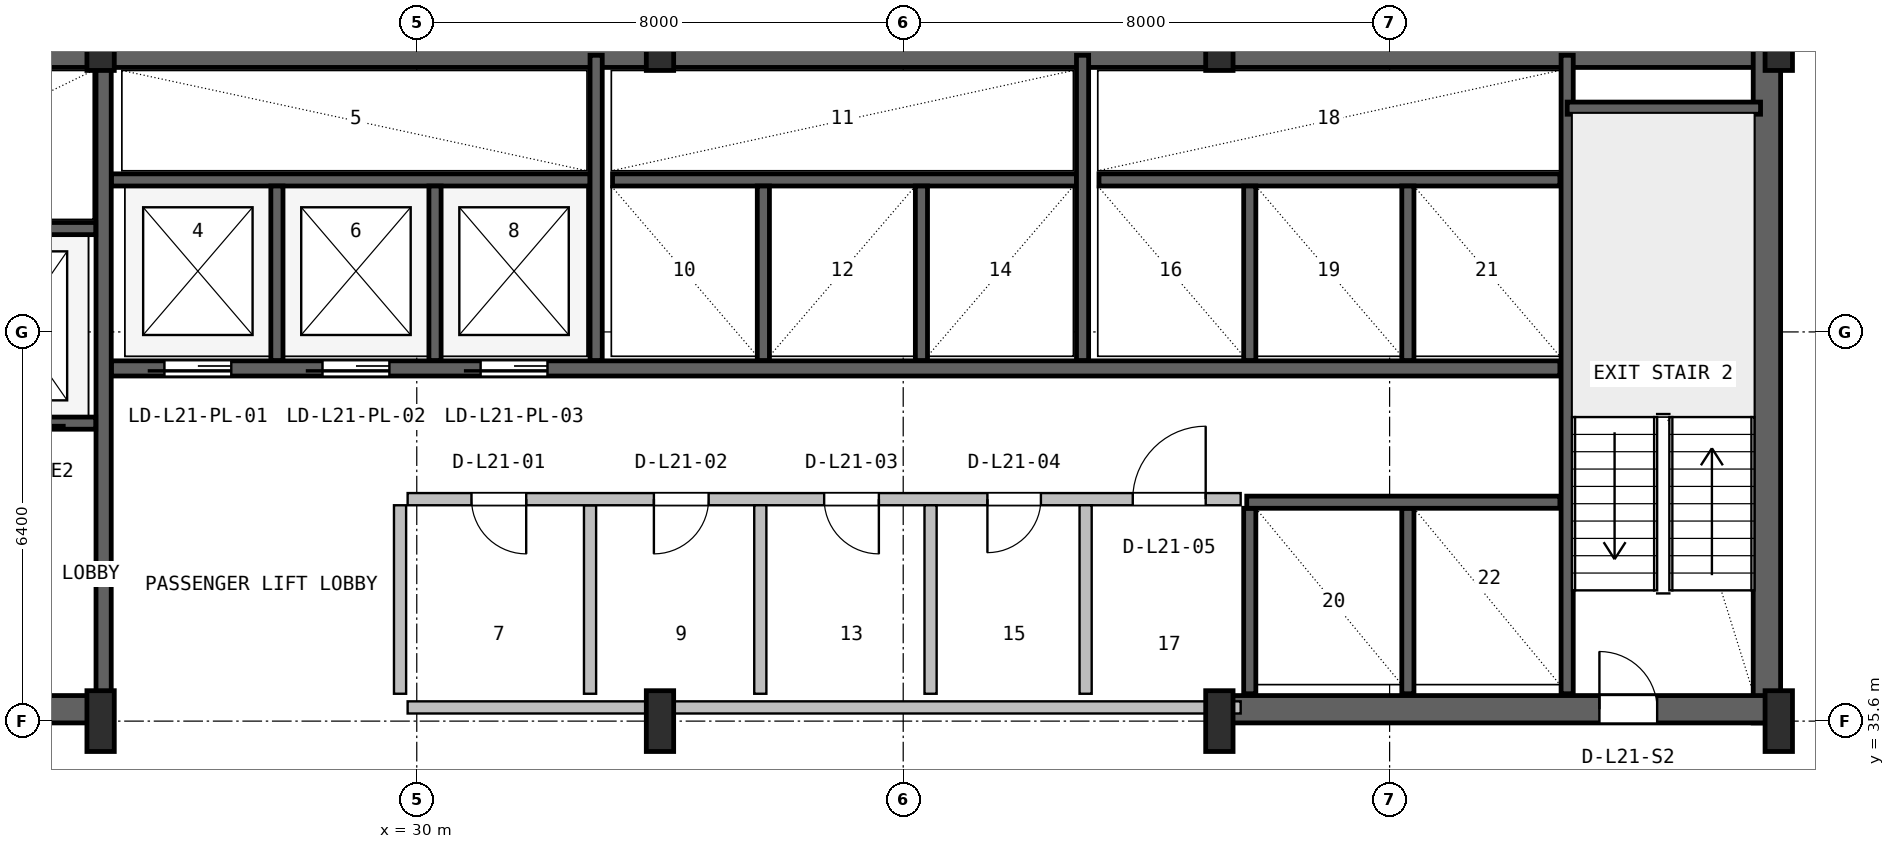
"""IFC4 building model, lengths in metres.
Left out: names, types, materials, properties, quantities, classifications, styles, units other than length and angle.
Written with IfcOpenShell. Run it as: python <this file> out.ifc"""

import sys

from ifc_helpers import new_model, si_unit, direction, frame, frame_2d, origin, origin_2d, place, context, subcontext, project, spatial, rectangle, i_section, extrude, source, transform, mapped, element, fill, save


model = new_model("IFC4")
c1 = context("Model", 3, precision=1e-05, world=origin(), true_north=direction((0.0, 1.0)))
c2 = subcontext(c1, "Body", "Model", "MODEL_VIEW")
j1 = project(units=[si_unit("LENGTHUNIT", "METRE"), si_unit("PLANEANGLEUNIT", "RADIAN")], contexts=[c1])
p1 = place(None, origin())
s1 = spatial("IfcSite", under=j1, at=p1, CompositionType="ELEMENT")
p2 = place(p1, origin())
s2 = spatial("IfcBuilding", under=s1, at=p2, CompositionType="ELEMENT")
p3 = place(p2, frame((0.0, 0.0, 90.8)))
s3 = spatial("IfcBuildingStorey", under=s2, at=p3, CompositionType="ELEMENT", Elevation=90.8)
p4 = place(p3, frame((15.6, 46.575, 0.0), z_axis=(0.0, 0.0, 1.0), x_axis=(1.0, 0.0, 0.0)))
e1 = element("IfcWall", 1, at=p4, inside=s3, PredefinedType="SHEAR", context=c2, shape_type="SweptSolid", body=[
    extrude(rectangle(XDim=36.8, YDim=0.45, at=frame_2d((18.4, 0.0))), origin(), (0.0, 0.0, 1.0), 3.55),
])
p5 = place(p3, frame((52.205, 35.57, 0.0), z_axis=(0.0, 0.0, 1.0), x_axis=(0.0, 1.0, 0.0)))
e2 = element("IfcWall", 2, at=p5, inside=s3, PredefinedType="SHEAR", context=c2, shape_type="SweptSolid", body=[
    extrude(rectangle(XDim=11.23, YDim=0.45, at=frame_2d((5.615, 0.0))), origin(), (0.0, 0.0, 1.0), 3.55),
])
p6 = place(p3, frame((15.57, 35.795, 0.0), z_axis=(0.0, 0.0, 1.0), x_axis=(1.0, 0.0, 0.0)))
e3 = element("IfcWall", 3, at=p6, inside=s3, PredefinedType="SHEAR", context=c2, shape_type="SweptSolid", body=[
    extrude(rectangle(XDim=9.23, YDim=0.45, at=frame_2d((4.615, 0.0))), origin(), (0.0, 0.0, 1.0), 3.55),
])
p7 = place(p6, frame((5.4, 0.0, 0.0)))
e4 = element("IfcOpeningElement", 4, at=p7, cuts=e3, PredefinedType="OPENING", context=c2, shape_type="SweptSolid", body=[
    extrude(rectangle(XDim=1.0, YDim=2.1, at=frame_2d((0.5, 1.05))), frame((0.0, 0.235, 0.0), z_axis=(0.0, -1.0, 0.0), x_axis=(1.0, 0.0, 0.0)), (0.0, 0.0, 1.0), 0.47),
])
p8 = place(p3, frame((43.2, 35.795, 0.0), z_axis=(0.0, 0.0, 1.0), x_axis=(1.0, 0.0, 0.0)))
e5 = element("IfcWall", 5, at=p8, inside=s3, PredefinedType="SHEAR", context=c2, shape_type="SweptSolid", body=[
    extrude(rectangle(XDim=9.23, YDim=0.45, at=frame_2d((4.615, 0.0))), origin(), (0.0, 0.0, 1.0), 3.55),
])
p9 = place(p8, frame((6.25, 0.0, 0.0)))
e6 = element("IfcOpeningElement", 6, at=p9, cuts=e5, PredefinedType="OPENING", context=c2, shape_type="SweptSolid", body=[
    extrude(rectangle(XDim=0.95, YDim=2.1, at=frame_2d((0.475, 1.05))), frame((0.0, 0.235, 0.0), z_axis=(0.0, -1.0, 0.0), x_axis=(1.0, 0.0, 0.0)), (0.0, 0.0, 1.0), 0.47),
])
m1 = source(origin(), c2, "Body", "SweptSolid", [
    extrude(i_section(OverallWidth=0.45, OverallDepth=1.0, WebThickness=0.016, FlangeThickness=0.03, FilletRadius=0.016, at=origin_2d()), origin(), (0.0, 0.0, 1.0), 3.8),
])
for number, where, z_axis, x_axis in (
    (7, (24.8, 35.6, 0.0), (0.0, 0.0, 1.0), (1.0, 0.0, 0.0)),
    (8, (24.8, 46.8, 0.0), (0.0, 0.0, 1.0), (1.0, 0.0, 0.0)),
    (9, (34.0, 35.6, 0.0), (0.0, 0.0, 1.0), (1.0, 0.0, 0.0)),
    (10, (34.0, 46.8, 0.0), (0.0, 0.0, 1.0), (1.0, 0.0, 0.0)),
    (11, (43.2, 35.6, 0.0), (0.0, 0.0, 1.0), (1.0, 0.0, 0.0)),
    (12, (43.2, 46.8, 0.0), (0.0, 0.0, 1.0), (1.0, 0.0, 0.0)),
    (13, (52.4, 35.6, 0.0), (0.0, 0.0, 1.0), (1.0, 0.0, 0.0)),
    (14, (52.4, 46.8, 0.0), (0.0, 0.0, 1.0), (1.0, 0.0, 0.0)),
):
    element("IfcColumn", number, at=place(p3, frame(where, z_axis=z_axis, x_axis=x_axis)), inside=s3, PredefinedType="COLUMN", context=c2, shape_type="MappedRepresentation", body=[
        mapped(m1, transform((0.0, 0.0, 0.0), x_axis=(1.0, 0.0, 0.0), y_axis=(0.0, 1.0, 0.0), z_axis=(0.0, 0.0, 1.0), scale=1.0)),
    ])
p10 = place(p3, frame((24.85, 36.05, 0.0), z_axis=(0.0, 0.0, 1.0), x_axis=(0.0, 1.0, 0.0)))
e15 = element("IfcWall", 15, at=p10, inside=s3, PredefinedType="SHEAR", context=c2, shape_type="SweptSolid", body=[
    extrude(rectangle(XDim=10.45, YDim=0.25, at=frame_2d((5.225, 0.0))), origin(), (0.0, 0.0, 1.0), 3.55),
])
p11 = place(p3, frame((19.2, 40.5, 0.0), z_axis=(0.0, 0.0, 1.0), x_axis=(1.0, 0.0, 0.0)))
e16 = element("IfcWall", 16, at=p11, inside=s3, PredefinedType="SHEAR", context=c2, shape_type="SweptSolid", body=[
    extrude(rectangle(XDim=5.52, YDim=0.2, at=frame_2d((2.76, 0.0))), origin(), (0.0, 0.0, 1.0), 3.55),
])
p12 = place(p11, frame((1.05, 0.0, 0.0)))
e17 = element("IfcOpeningElement", 17, at=p12, cuts=e16, PredefinedType="OPENING", context=c2, shape_type="SweptSolid", body=[
    extrude(rectangle(XDim=1.1, YDim=2.18, at=frame_2d((0.55, 1.09))), frame((0.0, 0.11, 0.0), z_axis=(0.0, -1.0, 0.0), x_axis=(1.0, 0.0, 0.0)), (0.0, 0.0, 1.0), 0.22),
])
p13 = place(p11, frame((3.65, 0.0, 0.0)))
e18 = element("IfcOpeningElement", 18, at=p13, cuts=e16, PredefinedType="OPENING", context=c2, shape_type="SweptSolid", body=[
    extrude(rectangle(XDim=1.1, YDim=2.18, at=frame_2d((0.55, 1.09))), frame((0.0, 0.11, 0.0), z_axis=(0.0, -1.0, 0.0), x_axis=(1.0, 0.0, 0.0)), (0.0, 0.0, 1.0), 0.22),
])
p14 = place(p3, frame((19.2, 43.7, 0.0), z_axis=(0.0, 0.0, 1.0), x_axis=(1.0, 0.0, 0.0)))
e19 = element("IfcWall", 19, at=p14, inside=s3, PredefinedType="SHEAR", context=c2, shape_type="SweptSolid", body=[
    extrude(rectangle(XDim=5.52, YDim=0.2, at=frame_2d((2.76, 0.0))), origin(), (0.0, 0.0, 1.0), 3.55),
])
p15 = place(p3, frame((48.92, 36.05, 0.0), z_axis=(0.0, 0.0, 1.0), x_axis=(0.0, 1.0, 0.0)))
e20 = element("IfcWall", 20, at=p15, inside=s3, PredefinedType="SHEAR", context=c2, shape_type="SweptSolid", body=[
    extrude(rectangle(XDim=10.5, YDim=0.2, at=frame_2d((5.25, 0.0))), origin(), (0.0, 0.0, 1.0), 3.55),
])
p16 = place(p3, frame((48.92, 45.68, 0.0), z_axis=(0.0, 0.0, 1.0), x_axis=(1.0, 0.0, 0.0)))
e21 = element("IfcWall", 21, at=p16, inside=s3, PredefinedType="SHEAR", context=c2, shape_type="SweptSolid", body=[
    extrude(rectangle(XDim=3.18, YDim=0.2, at=frame_2d((1.59, 0.0))), origin(), (0.0, 0.0, 1.0), 3.55),
])
p17 = place(p3, frame((24.98, 41.4, 0.0), z_axis=(0.0, 0.0, 1.0), x_axis=(1.0, 0.0, 0.0)))
e22 = element("IfcWall", 22, at=p17, inside=s3, PredefinedType="SHEAR", context=c2, shape_type="SweptSolid", body=[
    extrude(rectangle(XDim=23.82, YDim=0.25, at=frame_2d((11.91, 0.0))), origin(), (0.0, 0.0, 1.0), 3.55),
])
p18 = place(p17, frame((0.87, 0.0, 0.0)))
e23 = element("IfcOpeningElement", 23, at=p18, cuts=e22, PredefinedType="OPENING", context=c2, shape_type="SweptSolid", body=[
    extrude(rectangle(XDim=1.1, YDim=2.18, at=frame_2d((0.55, 1.09))), frame((0.0, 0.135, 0.0), z_axis=(0.0, -1.0, 0.0), x_axis=(1.0, 0.0, 0.0)), (0.0, 0.0, 1.0), 0.27),
])
p19 = place(p17, frame((3.47, 0.0, 0.0)))
e24 = element("IfcOpeningElement", 24, at=p19, cuts=e22, PredefinedType="OPENING", context=c2, shape_type="SweptSolid", body=[
    extrude(rectangle(XDim=1.1, YDim=2.18, at=frame_2d((0.55, 1.09))), frame((0.0, 0.135, 0.0), z_axis=(0.0, -1.0, 0.0), x_axis=(1.0, 0.0, 0.0)), (0.0, 0.0, 1.0), 0.27),
])
p20 = place(p17, frame((6.07, 0.0, 0.0)))
e25 = element("IfcOpeningElement", 25, at=p20, cuts=e22, PredefinedType="OPENING", context=c2, shape_type="SweptSolid", body=[
    extrude(rectangle(XDim=1.1, YDim=2.18, at=frame_2d((0.55, 1.09))), frame((0.0, 0.135, 0.0), z_axis=(0.0, -1.0, 0.0), x_axis=(1.0, 0.0, 0.0)), (0.0, 0.0, 1.0), 0.27),
])
p21 = place(p3, frame((24.98, 44.5, 0.0), z_axis=(0.0, 0.0, 1.0), x_axis=(1.0, 0.0, 0.0)))
e26 = element("IfcWall", 26, at=p21, inside=s3, PredefinedType="SHEAR", context=c2, shape_type="SweptSolid", body=[
    extrude(rectangle(XDim=7.87, YDim=0.2, at=frame_2d((3.935, 0.0))), origin(), (0.0, 0.0, 1.0), 3.55),
])
for number, where, z_axis, x_axis in (
    (27, (27.7, 41.53, 0.0), (0.0, 0.0, 1.0), (0.0, 1.0, 0.0)),
    (28, (30.3, 41.53, 0.0), (0.0, 0.0, 1.0), (0.0, 1.0, 0.0)),
):
    element("IfcWall", number, at=place(p3, frame(where, z_axis=z_axis, x_axis=x_axis)), inside=s3, PredefinedType="SHEAR", context=c2, shape_type="SweptSolid", body=[
        extrude(rectangle(XDim=2.87, YDim=0.2, at=frame_2d((1.435, 0.0))), origin(), (0.0, 0.0, 1.0), 3.55),
    ])
p22 = place(p3, frame((32.95, 41.53, 0.0), z_axis=(0.0, 0.0, 1.0), x_axis=(0.0, 1.0, 0.0)))
e29 = element("IfcWall", 29, at=p22, inside=s3, PredefinedType="SHEAR", context=c2, shape_type="SweptSolid", body=[
    extrude(rectangle(XDim=5.02, YDim=0.2, at=frame_2d((2.51, 0.0))), origin(), (0.0, 0.0, 1.0), 3.55),
])
p23 = place(p3, frame((33.22, 44.5, 0.0), z_axis=(0.0, 0.0, 1.0), x_axis=(1.0, 0.0, 0.0)))
e30 = element("IfcWall", 30, at=p23, inside=s3, PredefinedType="SHEAR", context=c2, shape_type="SweptSolid", body=[
    extrude(rectangle(XDim=7.63, YDim=0.2, at=frame_2d((3.815, 0.0))), origin(), (0.0, 0.0, 1.0), 3.55),
])
for number, where, z_axis, x_axis in (
    (31, (35.7, 41.53, 0.0), (0.0, 0.0, 1.0), (0.0, 1.0, 0.0)),
    (32, (38.3, 41.53, 0.0), (0.0, 0.0, 1.0), (0.0, 1.0, 0.0)),
):
    element("IfcWall", number, at=place(p3, frame(where, z_axis=z_axis, x_axis=x_axis)), inside=s3, PredefinedType="SHEAR", context=c2, shape_type="SweptSolid", body=[
        extrude(rectangle(XDim=2.87, YDim=0.2, at=frame_2d((1.435, 0.0))), origin(), (0.0, 0.0, 1.0), 3.55),
    ])
p24 = place(p3, frame((40.95, 41.53, 0.0), z_axis=(0.0, 0.0, 1.0), x_axis=(0.0, 1.0, 0.0)))
e33 = element("IfcWall", 33, at=p24, inside=s3, PredefinedType="SHEAR", context=c2, shape_type="SweptSolid", body=[
    extrude(rectangle(XDim=5.02, YDim=0.2, at=frame_2d((2.51, 0.0))), origin(), (0.0, 0.0, 1.0), 3.55),
])
p25 = place(p3, frame((41.22, 44.5, 0.0), z_axis=(0.0, 0.0, 1.0), x_axis=(1.0, 0.0, 0.0)))
e34 = element("IfcWall", 34, at=p25, inside=s3, PredefinedType="SHEAR", context=c2, shape_type="SweptSolid", body=[
    extrude(rectangle(XDim=7.58, YDim=0.2, at=frame_2d((3.79, 0.0))), origin(), (0.0, 0.0, 1.0), 3.55),
])
for number, where, z_axis, x_axis in (
    (35, (43.7, 41.53, 0.0), (0.0, 0.0, 1.0), (0.0, 1.0, 0.0)),
    (36, (46.3, 41.53, 0.0), (0.0, 0.0, 1.0), (0.0, 1.0, 0.0)),
):
    element("IfcWall", number, at=place(p3, frame(where, z_axis=z_axis, x_axis=x_axis)), inside=s3, PredefinedType="SHEAR", context=c2, shape_type="SweptSolid", body=[
        extrude(rectangle(XDim=2.87, YDim=0.2, at=frame_2d((1.435, 0.0))), origin(), (0.0, 0.0, 1.0), 3.55),
    ])
for number, where, z_axis, x_axis in (
    (37, (43.7, 36.05, 0.0), (0.0, 0.0, 1.0), (0.0, 1.0, 0.0)),
    (38, (46.3, 36.05, 0.0), (0.0, 0.0, 1.0), (0.0, 1.0, 0.0)),
):
    element("IfcWall", number, at=place(p3, frame(where, z_axis=z_axis, x_axis=x_axis)), inside=s3, PredefinedType="SHEAR", context=c2, shape_type="SweptSolid", body=[
        extrude(rectangle(XDim=3.05, YDim=0.2, at=frame_2d((1.525, 0.0))), origin(), (0.0, 0.0, 1.0), 3.55),
    ])
p26 = place(p3, frame((43.65, 39.2, 0.0), z_axis=(0.0, 0.0, 1.0), x_axis=(1.0, 0.0, 0.0)))
e39 = element("IfcWall", 39, at=p26, inside=s3, PredefinedType="SHEAR", context=c2, shape_type="SweptSolid", body=[
    extrude(rectangle(XDim=5.15, YDim=0.2, at=frame_2d((2.575, 0.0))), origin(), (0.0, 0.0, 1.0), 3.55),
])
p27 = place(p3, frame((29.85, 35.825, 0.0), z_axis=(0.0, 0.0, 1.0), x_axis=(1.0, 0.0, 0.0)))
e40 = element("IfcWall", 40, at=p27, inside=s3, PredefinedType="SOLIDWALL", context=c2, shape_type="SweptSolid", body=[
    extrude(rectangle(XDim=13.7, YDim=0.2, at=frame_2d((6.85, 0.0))), origin(), (0.0, 0.0, 1.0), 2.325),
])
p28 = place(p3, frame((32.85, 36.05, 0.0), z_axis=(0.0, 0.0, 1.0), x_axis=(0.0, 1.0, 0.0)))
e41 = element("IfcWall", 41, at=p28, inside=s3, PredefinedType="PLUMBINGWALL", context=c2, shape_type="SweptSolid", body=[
    extrude(rectangle(XDim=3.1, YDim=0.2, at=frame_2d((1.55, 0.0))), origin(), (0.0, 0.0, 1.0), 3.53),
])
p29 = place(p3, frame((29.85, 39.25, 0.0), z_axis=(0.0, 0.0, 1.0), x_axis=(1.0, 0.0, 0.0)))
e42 = element("IfcWall", 42, at=p29, inside=s3, PredefinedType="SOLIDWALL", context=c2, shape_type="SweptSolid", body=[
    extrude(rectangle(XDim=13.7, YDim=0.2, at=frame_2d((6.85, 0.0))), origin(), (0.0, 0.0, 1.0), 3.53),
])
p30 = place(p29, frame((1.05, 0.0, 0.0)))
e43 = element("IfcOpeningElement", 43, at=p30, cuts=e42, PredefinedType="OPENING", context=c2, shape_type="SweptSolid", body=[
    extrude(rectangle(XDim=0.9, YDim=2.06, at=frame_2d((0.45, 1.03))), frame((0.0, 0.11, 0.0), z_axis=(0.0, -1.0, 0.0), x_axis=(1.0, 0.0, 0.0)), (0.0, 0.0, 1.0), 0.22),
])
p31 = place(p29, frame((4.05, 0.0, 0.0)))
e44 = element("IfcOpeningElement", 44, at=p31, cuts=e42, PredefinedType="OPENING", context=c2, shape_type="SweptSolid", body=[
    extrude(rectangle(XDim=0.9, YDim=2.06, at=frame_2d((0.45, 1.03))), frame((0.0, 0.11, 0.0), z_axis=(0.0, -1.0, 0.0), x_axis=(1.0, 0.0, 0.0)), (0.0, 0.0, 1.0), 0.22),
])
p32 = place(p29, frame((6.85, 0.0, 0.0)))
e45 = element("IfcOpeningElement", 45, at=p32, cuts=e42, PredefinedType="OPENING", context=c2, shape_type="SweptSolid", body=[
    extrude(rectangle(XDim=0.9, YDim=2.06, at=frame_2d((0.45, 1.03))), frame((0.0, 0.11, 0.0), z_axis=(0.0, -1.0, 0.0), x_axis=(1.0, 0.0, 0.0)), (0.0, 0.0, 1.0), 0.22),
])
p33 = place(p29, frame((9.535, 0.0, 0.0)))
e46 = element("IfcOpeningElement", 46, at=p33, cuts=e42, PredefinedType="OPENING", context=c2, shape_type="SweptSolid", body=[
    extrude(rectangle(XDim=0.88, YDim=2.06, at=frame_2d((0.44, 1.03))), frame((0.0, 0.11, 0.0), z_axis=(0.0, -1.0, 0.0), x_axis=(1.0, 0.0, 0.0)), (0.0, 0.0, 1.0), 0.22),
])
p34 = place(p29, frame((11.925, 0.0, 0.0)))
e47 = element("IfcOpeningElement", 47, at=p34, cuts=e42, PredefinedType="OPENING", context=c2, shape_type="SweptSolid", body=[
    extrude(rectangle(XDim=1.2, YDim=2.1, at=frame_2d((0.6, 1.05))), frame((0.0, 0.11, 0.0), z_axis=(0.0, -1.0, 0.0), x_axis=(1.0, 0.0, 0.0)), (0.0, 0.0, 1.0), 0.22),
])
for number, where, z_axis, x_axis in (
    (48, (29.725, 36.05, 0.0), (0.0, 0.0, 1.0), (0.0, 1.0, 0.0)),
    (49, (35.65, 36.05, 0.0), (0.0, 0.0, 1.0), (0.0, 1.0, 0.0)),
    (50, (38.45, 36.05, 0.0), (0.0, 0.0, 1.0), (0.0, 1.0, 0.0)),
):
    element("IfcWall", number, at=place(p3, frame(where, z_axis=z_axis, x_axis=x_axis)), inside=s3, PredefinedType="PLUMBINGWALL", context=c2, shape_type="SweptSolid", body=[
        extrude(rectangle(XDim=3.1, YDim=0.2, at=frame_2d((1.55, 0.0))), origin(), (0.0, 0.0, 1.0), 3.53),
    ])
p35 = place(p3, frame((41.0, 36.05, 0.0), z_axis=(0.0, 0.0, 1.0), x_axis=(0.0, 1.0, 0.0)))
e51 = element("IfcWall", 51, at=p35, inside=s3, PredefinedType="SOLIDWALL", context=c2, shape_type="SweptSolid", body=[
    extrude(rectangle(XDim=3.1, YDim=0.2, at=frame_2d((1.55, 0.0))), origin(), (0.0, 0.0, 1.0), 3.53),
])
m2 = source(origin(), c2, "Body", "SweptSolid", [
    extrude(rectangle(XDim=0.95, YDim=2.1, at=frame_2d((0.475, 1.05))), frame((0.0, 0.025, 0.0), z_axis=(0.0, -1.0, 0.0), x_axis=(1.0, 0.0, 0.0)), (0.0, 0.0, 1.0), 0.05),
])
p36 = place(p9, origin())
e52 = element("IfcDoor", 52, at=p36, inside=s3, OperationType="SINGLE_SWING_LEFT", PredefinedType="DOOR", context=c2, shape_type="MappedRepresentation", body=[
    mapped(m2, transform((0.0, 0.0, 0.0), x_axis=(1.0, 0.0, 0.0), y_axis=(0.0, 1.0, 0.0), z_axis=(0.0, 0.0, 1.0), scale=1.0)),
])
fill(e6, e52)
m3 = source(origin(), c2, "Body", "SweptSolid", [
    extrude(rectangle(XDim=1.1, YDim=2.18, at=frame_2d((0.55, 1.09))), frame((0.0, 0.025, 0.0), z_axis=(0.0, -1.0, 0.0), x_axis=(1.0, 0.0, 0.0)), (0.0, 0.0, 1.0), 0.05),
])
p37 = place(p18, frame((1.1, 0.0, 0.0), z_axis=(0.0, 0.0, 1.0), x_axis=(-1.0, 0.0, 0.0)))
e53 = element("IfcDoor", 53, at=p37, inside=s3, OperationType="SLIDING_TO_LEFT", PredefinedType="DOOR", context=c2, shape_type="MappedRepresentation", body=[
    mapped(m3, transform((0.0, 0.0, 0.0), x_axis=(1.0, 0.0, 0.0), y_axis=(0.0, 1.0, 0.0), z_axis=(0.0, 0.0, 1.0), scale=1.0)),
])
fill(e23, e53)
p38 = place(p19, frame((1.1, 0.0, 0.0), z_axis=(0.0, 0.0, 1.0), x_axis=(-1.0, 0.0, 0.0)))
e54 = element("IfcDoor", 54, at=p38, inside=s3, OperationType="SLIDING_TO_LEFT", PredefinedType="DOOR", context=c2, shape_type="MappedRepresentation", body=[
    mapped(m3, transform((0.0, 0.0, 0.0), x_axis=(1.0, 0.0, 0.0), y_axis=(0.0, 1.0, 0.0), z_axis=(0.0, 0.0, 1.0), scale=1.0)),
])
fill(e24, e54)
p39 = place(p20, frame((1.1, 0.0, 0.0), z_axis=(0.0, 0.0, 1.0), x_axis=(-1.0, 0.0, 0.0)))
e55 = element("IfcDoor", 55, at=p39, inside=s3, OperationType="SLIDING_TO_LEFT", PredefinedType="DOOR", context=c2, shape_type="MappedRepresentation", body=[
    mapped(m3, transform((0.0, 0.0, 0.0), x_axis=(1.0, 0.0, 0.0), y_axis=(0.0, 1.0, 0.0), z_axis=(0.0, 0.0, 1.0), scale=1.0)),
])
fill(e25, e55)
m4 = source(origin(), c2, "Body", "SweptSolid", [
    extrude(rectangle(XDim=0.9, YDim=2.06, at=frame_2d((0.45, 1.03))), frame((0.0, 0.025, 0.0), z_axis=(0.0, -1.0, 0.0), x_axis=(1.0, 0.0, 0.0)), (0.0, 0.0, 1.0), 0.05),
])
p40 = place(p30, frame((0.9, 0.0, 0.0), z_axis=(0.0, 0.0, 1.0), x_axis=(-1.0, 0.0, 0.0)))
e56 = element("IfcDoor", 56, at=p40, inside=s3, OperationType="SINGLE_SWING_RIGHT", PredefinedType="DOOR", context=c2, shape_type="MappedRepresentation", body=[
    mapped(m4, transform((0.0, 0.0, 0.0), x_axis=(1.0, 0.0, 0.0), y_axis=(0.0, 1.0, 0.0), z_axis=(0.0, 0.0, 1.0), scale=1.0)),
])
fill(e43, e56)
p41 = place(p31, frame((0.9, 0.0, 0.0), z_axis=(0.0, 0.0, 1.0), x_axis=(-1.0, 0.0, 0.0)))
e57 = element("IfcDoor", 57, at=p41, inside=s3, OperationType="SINGLE_SWING_LEFT", PredefinedType="DOOR", context=c2, shape_type="MappedRepresentation", body=[
    mapped(m4, transform((0.0, 0.0, 0.0), x_axis=(1.0, 0.0, 0.0), y_axis=(0.0, 1.0, 0.0), z_axis=(0.0, 0.0, 1.0), scale=1.0)),
])
fill(e44, e57)
p42 = place(p32, frame((0.9, 0.0, 0.0), z_axis=(0.0, 0.0, 1.0), x_axis=(-1.0, 0.0, 0.0)))
e58 = element("IfcDoor", 58, at=p42, inside=s3, OperationType="SINGLE_SWING_RIGHT", PredefinedType="DOOR", context=c2, shape_type="MappedRepresentation", body=[
    mapped(m4, transform((0.0, 0.0, 0.0), x_axis=(1.0, 0.0, 0.0), y_axis=(0.0, 1.0, 0.0), z_axis=(0.0, 0.0, 1.0), scale=1.0)),
])
fill(e45, e58)
m5 = source(origin(), c2, "Body", "SweptSolid", [
    extrude(rectangle(XDim=0.88, YDim=2.06, at=frame_2d((0.44, 1.03))), frame((0.0, 0.025, 0.0), z_axis=(0.0, -1.0, 0.0), x_axis=(1.0, 0.0, 0.0)), (0.0, 0.0, 1.0), 0.05),
])
p43 = place(p33, frame((0.88, 0.0, 0.0), z_axis=(0.0, 0.0, 1.0), x_axis=(-1.0, 0.0, 0.0)))
e59 = element("IfcDoor", 59, at=p43, inside=s3, OperationType="SINGLE_SWING_LEFT", PredefinedType="DOOR", context=c2, shape_type="MappedRepresentation", body=[
    mapped(m5, transform((0.0, 0.0, 0.0), x_axis=(1.0, 0.0, 0.0), y_axis=(0.0, 1.0, 0.0), z_axis=(0.0, 0.0, 1.0), scale=1.0)),
])
fill(e46, e59)
m6 = source(origin(), c2, "Body", "SweptSolid", [
    extrude(rectangle(XDim=1.2, YDim=2.1, at=frame_2d((0.6, 1.05))), frame((0.0, 0.025, 0.0), z_axis=(0.0, -1.0, 0.0), x_axis=(1.0, 0.0, 0.0)), (0.0, 0.0, 1.0), 0.05),
])
p44 = place(p34, origin())
e60 = element("IfcDoor", 60, at=p44, inside=s3, OperationType="SINGLE_SWING_RIGHT", PredefinedType="DOOR", context=c2, shape_type="MappedRepresentation", body=[
    mapped(m6, transform((0.0, 0.0, 0.0), x_axis=(1.0, 0.0, 0.0), y_axis=(0.0, 1.0, 0.0), z_axis=(0.0, 0.0, 1.0), scale=1.0)),
])
fill(e47, e60)
save(model, sys.argv[1])
